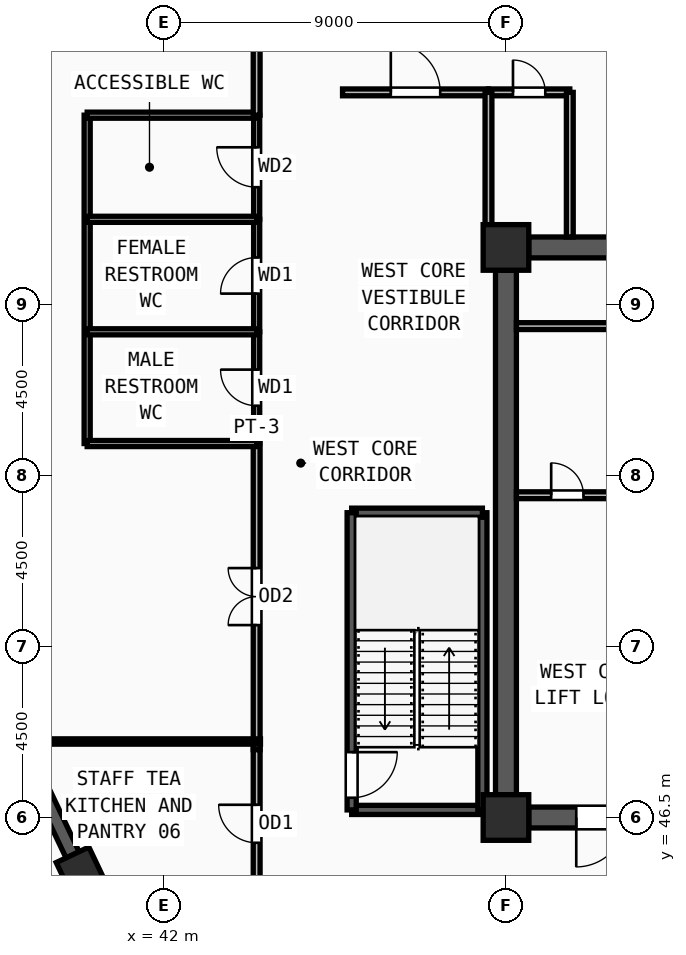
"""IFC4 building model, lengths in metres.
Left out: names, types, materials, properties, quantities, classifications, styles, units other than length and angle.
Written with IfcOpenShell. Run it as: python <this file> out.ifc"""

import sys

from ifc_helpers import new_model, si_unit, direction, frame, frame_2d, origin, origin_2d, place, context, subcontext, project, spatial, rectangle, extrude, source, transform, mapped, element, fill, save


model = new_model("IFC4")
c1 = context("Model", 3, precision=1e-05, world=origin(), true_north=direction((0.0, 1.0)))
c2 = subcontext(c1, "Body", "Model", "MODEL_VIEW")
j1 = project(units=[si_unit("LENGTHUNIT", "METRE"), si_unit("PLANEANGLEUNIT", "RADIAN")], contexts=[c1])
p1 = place(None, origin())
s1 = spatial("IfcSite", under=j1, at=p1, CompositionType="ELEMENT")
p2 = place(p1, origin())
s2 = spatial("IfcBuilding", under=s1, at=p2, CompositionType="ELEMENT")
p3 = place(p2, frame((0.0, 0.0, 309.0)))
s3 = spatial("IfcBuildingStorey", under=s2, at=p3, CompositionType="ELEMENT", Elevation=309.0)
m1 = source(origin(), c2, "Body", "SweptSolid", [
    extrude(rectangle(XDim=1.2, YDim=1.2, at=origin_2d()), origin(), (0.0, 0.0, 1.0), 3.75),
])
for number, where, z_axis, x_axis in (
    (1, (51.0, 46.5, 0.0), (0.0, 0.0, 1.0), (1.0, 0.0, 0.0)),
    (2, (51.0, 61.5, 0.0), (0.0, 0.0, 1.0), (1.0, 0.0, 0.0)),
):
    element("IfcColumn", number, at=place(p3, frame(where, z_axis=z_axis, x_axis=x_axis)), inside=s3, PredefinedType="COLUMN", context=c2, shape_type="MappedRepresentation", body=[
        mapped(m1, transform((0.0, 0.0, 0.0), x_axis=(1.0, 0.0, 0.0), y_axis=(0.0, 1.0, 0.0), z_axis=(0.0, 0.0, 1.0), scale=1.0)),
    ])
m2 = source(origin(), c2, "Body", "SweptSolid", [
    extrude(rectangle(XDim=1.1, YDim=0.95, at=origin_2d()), origin(), (0.0, 0.0, 1.0), 3.75),
])
p4 = place(p3, frame((39.831, 45.022, 0.0), z_axis=(0.0, 0.0, 1.0), x_axis=(-0.428619783775, 0.903484964433, 0.0)))
e3 = element("IfcColumn", 3, at=p4, inside=s3, PredefinedType="COLUMN", context=c2, shape_type="MappedRepresentation", body=[
    mapped(m2, transform((0.0, 0.0, 0.0), x_axis=(1.0, 0.0, 0.0), y_axis=(0.0, 1.0, 0.0), z_axis=(0.0, 0.0, 1.0), scale=1.0)),
])
p5 = place(p3, frame((30.273, 65.167, 0.0), z_axis=(0.0, 0.0, 1.0), x_axis=(0.428684844901, -0.903454096096, 0.0)))
e4 = element("IfcWall", 4, at=p5, inside=s3, PredefinedType="SOLIDWALL", context=c2, shape_type="SweptSolid", body=[
    extrude(rectangle(XDim=21.758, YDim=0.38, at=frame_2d((10.879, 0.0))), origin(), (0.0, 0.0, 1.0), 3.57),
])
m3 = source(origin(), c2, "Body", "SweptSolid", [
    extrude(rectangle(XDim=1.35, YDim=1.85, at=frame_2d((0.675, 0.925))), frame((0.0, 0.2, 0.0), z_axis=(0.0, -1.0, 0.0), x_axis=(1.0, 0.0, 0.0)), (0.0, 0.0, 1.0), 0.4),
])
p6 = place(p5, frame((4.764, 0.0, 0.55)))
e5 = element("IfcOpeningElement", 5, at=p6, cuts=e4, PredefinedType="OPENING", context=c2, shape_type="MappedRepresentation", body=[
    mapped(m3, transform((0.0, 0.0, 0.0), x_axis=(1.0, 0.0, 0.0), y_axis=(0.0, 1.0, 0.0), z_axis=(0.0, 0.0, 1.0), scale=1.0)),
])
p7 = place(p5, frame((10.204, 0.0, 0.55)))
e6 = element("IfcOpeningElement", 6, at=p7, cuts=e4, PredefinedType="OPENING", context=c2, shape_type="MappedRepresentation", body=[
    mapped(m3, transform((0.0, 0.0, 0.0), x_axis=(1.0, 0.0, 0.0), y_axis=(0.0, 1.0, 0.0), z_axis=(0.0, 0.0, 1.0), scale=1.0)),
])
p8 = place(p5, frame((15.643, 0.0, 0.55)))
e7 = element("IfcOpeningElement", 7, at=p8, cuts=e4, PredefinedType="OPENING", context=c2, shape_type="MappedRepresentation", body=[
    mapped(m3, transform((0.0, 0.0, 0.0), x_axis=(1.0, 0.0, 0.0), y_axis=(0.0, 1.0, 0.0), z_axis=(0.0, 0.0, 1.0), scale=1.0)),
])
p9 = place(p3, frame((51.6, 61.5, 0.0), z_axis=(0.0, 0.0, 1.0), x_axis=(1.0, 0.0, 0.0)))
e8 = element("IfcWall", 8, at=p9, inside=s3, PredefinedType="SHEAR", context=c2, shape_type="SweptSolid", body=[
    extrude(rectangle(XDim=7.8, YDim=0.55, at=frame_2d((3.9, 0.0))), origin(), (0.0, 0.0, 1.0), 3.57),
])
p10 = place(p3, frame((59.4, 46.5, 0.0), z_axis=(0.0, 0.0, 1.0), x_axis=(-1.0, 0.0, 0.0)))
e9 = element("IfcWall", 9, at=p10, inside=s3, PredefinedType="SHEAR", context=c2, shape_type="SweptSolid", body=[
    extrude(rectangle(XDim=7.8, YDim=0.55, at=frame_2d((3.9, 0.0))), origin(), (0.0, 0.0, 1.0), 3.57),
])
m4 = source(origin(), c2, "Body", "SweptSolid", [
    extrude(rectangle(XDim=1.3, YDim=2.2, at=frame_2d((0.65, 1.1))), frame((0.0, 0.285, 0.0), z_axis=(0.0, -1.0, 0.0), x_axis=(1.0, 0.0, 0.0)), (0.0, 0.0, 1.0), 0.57),
])
p11 = place(p10, frame((5.25, 0.0, 0.0)))
e10 = element("IfcOpeningElement", 10, at=p11, cuts=e9, PredefinedType="OPENING", context=c2, shape_type="MappedRepresentation", body=[
    mapped(m4, transform((0.0, 0.0, 0.0), x_axis=(1.0, 0.0, 0.0), y_axis=(0.0, 1.0, 0.0), z_axis=(0.0, 0.0, 1.0), scale=1.0)),
])
m5 = source(origin(), c2, "Body", "SweptSolid", [
    extrude(rectangle(XDim=1.0, YDim=2.2, at=frame_2d((0.5, 1.1))), frame((0.0, 0.285, 0.0), z_axis=(0.0, -1.0, 0.0), x_axis=(1.0, 0.0, 0.0)), (0.0, 0.0, 1.0), 0.57),
])
p12 = place(p10, frame((0.75, 0.0, 0.0)))
e11 = element("IfcOpeningElement", 11, at=p12, cuts=e9, PredefinedType="OPENING", context=c2, shape_type="MappedRepresentation", body=[
    mapped(m5, transform((0.0, 0.0, 0.0), x_axis=(1.0, 0.0, 0.0), y_axis=(0.0, 1.0, 0.0), z_axis=(0.0, 0.0, 1.0), scale=1.0)),
])
p13 = place(p3, frame((51.0, 47.1, 0.0), z_axis=(0.0, 0.0, 1.0), x_axis=(0.0, 1.0, 0.0)))
e12 = element("IfcWall", 12, at=p13, inside=s3, PredefinedType="SHEAR", context=c2, shape_type="SweptSolid", body=[
    extrude(rectangle(XDim=13.8, YDim=0.55, at=frame_2d((6.9, 0.0))), origin(), (0.0, 0.0, 1.0), 3.57),
])
p14 = place(p3, frame((46.94, 46.7, 0.0), z_axis=(0.0, 0.0, 1.0), x_axis=(1.0, 0.0, 0.0)))
e13 = element("IfcWall", 13, at=p14, inside=s3, PredefinedType="SOLIDWALL", context=c2, shape_type="SweptSolid", body=[
    extrude(rectangle(XDim=3.44, YDim=0.24, at=frame_2d((1.72, 0.0))), origin(), (0.0, 0.0, 1.0), 3.57),
])
p15 = place(p3, frame((50.38, 46.7, 0.0), z_axis=(0.0, 0.0, 1.0), x_axis=(0.0, 1.0, 0.0)))
e14 = element("IfcWall", 14, at=p15, inside=s3, PredefinedType="SOLIDWALL", context=c2, shape_type="SweptSolid", body=[
    extrude(rectangle(XDim=7.82, YDim=0.24, at=frame_2d((3.91, 0.0))), origin(), (0.0, 0.0, 1.0), 3.57),
])
p16 = place(p3, frame((50.38, 54.52, 0.0), z_axis=(0.0, 0.0, 1.0), x_axis=(-1.0, 0.0, 0.0)))
e15 = element("IfcWall", 15, at=p16, inside=s3, PredefinedType="SOLIDWALL", context=c2, shape_type="SweptSolid", body=[
    extrude(rectangle(XDim=3.44, YDim=0.24, at=frame_2d((1.72, 0.0))), origin(), (0.0, 0.0, 1.0), 3.57),
])
p17 = place(p3, frame((46.94, 54.52, 0.0), z_axis=(0.0, 0.0, 1.0), x_axis=(0.0, -1.0, 0.0)))
e16 = element("IfcWall", 16, at=p17, inside=s3, PredefinedType="SOLIDWALL", context=c2, shape_type="SweptSolid", body=[
    extrude(rectangle(XDim=7.82, YDim=0.24, at=frame_2d((3.91, 0.0))), origin(), (0.0, 0.0, 1.0), 3.57),
])
m6 = source(origin(), c2, "Body", "SweptSolid", [
    extrude(rectangle(XDim=1.2, YDim=2.2, at=frame_2d((0.6, 1.1))), frame((0.0, 0.13, 0.0), z_axis=(0.0, -1.0, 0.0), x_axis=(1.0, 0.0, 0.0)), (0.0, 0.0, 1.0), 0.26),
])
p18 = place(p17, frame((6.3, 0.0, 0.0)))
e17 = element("IfcOpeningElement", 17, at=p18, cuts=e16, PredefinedType="OPENING", context=c2, shape_type="MappedRepresentation", body=[
    mapped(m6, transform((0.0, 0.0, 0.0), x_axis=(1.0, 0.0, 0.0), y_axis=(0.0, 1.0, 0.0), z_axis=(0.0, 0.0, 1.0), scale=1.0)),
])
p19 = place(p3, frame((51.275, 54.98, 0.0), z_axis=(0.0, 0.0, 1.0), x_axis=(1.0, 0.0, 0.0)))
e18 = element("IfcWall", 18, at=p19, inside=s3, PredefinedType="PARTITIONING", context=c2, shape_type="SweptSolid", body=[
    extrude(rectangle(XDim=2.485, YDim=0.18, at=frame_2d((1.243, 0.0))), origin(), (0.0, 0.0, 1.0), 3.57),
])
m7 = source(origin(), c2, "Body", "SweptSolid", [
    extrude(rectangle(XDim=0.85, YDim=2.1, at=frame_2d((0.425, 1.05))), frame((0.0, 0.1, 0.0), z_axis=(0.0, -1.0, 0.0), x_axis=(1.0, 0.0, 0.0)), (0.0, 0.0, 1.0), 0.2),
])
p20 = place(p19, frame((0.915, 0.0, 0.0)))
e19 = element("IfcOpeningElement", 19, at=p20, cuts=e18, PredefinedType="OPENING", context=c2, shape_type="MappedRepresentation", body=[
    mapped(m7, transform((0.0, 0.0, 0.0), x_axis=(1.0, 0.0, 0.0), y_axis=(0.0, 1.0, 0.0), z_axis=(0.0, 0.0, 1.0), scale=1.0)),
])
p21 = place(p3, frame((44.44, 56.34, 0.0), z_axis=(0.0, 0.0, 1.0), x_axis=(0.0, 1.0, 0.0)))
e20 = element("IfcWall", 20, at=p21, inside=s3, PredefinedType="PARTITIONING", context=c2, shape_type="SweptSolid", body=[
    extrude(rectangle(XDim=2.94, YDim=0.16, at=frame_2d((1.47, 0.0))), origin(), (0.0, 0.0, 1.0), 3.57),
])
m8 = source(origin(), c2, "Body", "SweptSolid", [
    extrude(rectangle(XDim=0.95, YDim=2.15, at=frame_2d((0.475, 1.075))), frame((0.0, 0.09, 0.0), z_axis=(0.0, -1.0, 0.0), x_axis=(1.0, 0.0, 0.0)), (0.0, 0.0, 1.0), 0.18),
])
p22 = place(p21, frame((0.995, 0.0, 0.0)))
e21 = element("IfcOpeningElement", 21, at=p22, cuts=e20, PredefinedType="OPENING", context=c2, shape_type="MappedRepresentation", body=[
    mapped(m8, transform((0.0, 0.0, 0.0), x_axis=(1.0, 0.0, 0.0), y_axis=(0.0, 1.0, 0.0), z_axis=(0.0, 0.0, 1.0), scale=1.0)),
])
p23 = place(p3, frame((44.44, 59.28, 0.0), z_axis=(0.0, 0.0, 1.0), x_axis=(0.0, 1.0, 0.0)))
e22 = element("IfcWall", 22, at=p23, inside=s3, PredefinedType="PARTITIONING", context=c2, shape_type="SweptSolid", body=[
    extrude(rectangle(XDim=2.96, YDim=0.16, at=frame_2d((1.48, 0.0))), origin(), (0.0, 0.0, 1.0), 3.57),
])
p24 = place(p23, frame((1.005, 0.0, 0.0)))
e23 = element("IfcOpeningElement", 23, at=p24, cuts=e22, PredefinedType="OPENING", context=c2, shape_type="MappedRepresentation", body=[
    mapped(m8, transform((0.0, 0.0, 0.0), x_axis=(1.0, 0.0, 0.0), y_axis=(0.0, 1.0, 0.0), z_axis=(0.0, 0.0, 1.0), scale=1.0)),
])
p25 = place(p3, frame((44.44, 62.24, 0.0), z_axis=(0.0, 0.0, 1.0), x_axis=(0.0, 1.0, 0.0)))
e24 = element("IfcWall", 24, at=p25, inside=s3, PredefinedType="PARTITIONING", context=c2, shape_type="SweptSolid", body=[
    extrude(rectangle(XDim=2.74, YDim=0.16, at=frame_2d((1.37, 0.0))), origin(), (0.0, 0.0, 1.0), 3.57),
])
m9 = source(origin(), c2, "Body", "SweptSolid", [
    extrude(rectangle(XDim=1.05, YDim=2.15, at=frame_2d((0.525, 1.075))), frame((0.0, 0.09, 0.0), z_axis=(0.0, -1.0, 0.0), x_axis=(1.0, 0.0, 0.0)), (0.0, 0.0, 1.0), 0.18),
])
p26 = place(p25, frame((0.845, 0.0, 0.0)))
e25 = element("IfcOpeningElement", 25, at=p26, cuts=e24, PredefinedType="OPENING", context=c2, shape_type="MappedRepresentation", body=[
    mapped(m9, transform((0.0, 0.0, 0.0), x_axis=(1.0, 0.0, 0.0), y_axis=(0.0, 1.0, 0.0), z_axis=(0.0, 0.0, 1.0), scale=1.0)),
])
p27 = place(p3, frame((50.54, 65.58, 0.0), z_axis=(0.0, 0.0, 1.0), x_axis=(1.0, 0.0, 0.0)))
e26 = element("IfcWall", 26, at=p27, inside=s3, PredefinedType="PARTITIONING", context=c2, shape_type="SweptSolid", body=[
    extrude(rectangle(XDim=2.14, YDim=0.18, at=frame_2d((1.07, 0.0))), origin(), (0.0, 0.0, 1.0), 3.57),
])
p28 = place(p27, frame((0.645, 0.0, 0.0)))
e27 = element("IfcOpeningElement", 27, at=p28, cuts=e26, PredefinedType="OPENING", context=c2, shape_type="MappedRepresentation", body=[
    mapped(m7, transform((0.0, 0.0, 0.0), x_axis=(1.0, 0.0, 0.0), y_axis=(0.0, 1.0, 0.0), z_axis=(0.0, 0.0, 1.0), scale=1.0)),
])
p29 = place(p3, frame((46.7, 65.58, 0.0), z_axis=(0.0, 0.0, 1.0), x_axis=(1.0, 0.0, 0.0)))
e28 = element("IfcWall", 28, at=p29, inside=s3, PredefinedType="PARTITIONING", context=c2, shape_type="SweptSolid", body=[
    extrude(rectangle(XDim=3.84, YDim=0.18, at=frame_2d((1.92, 0.0))), origin(), (0.0, 0.0, 1.0), 3.57),
])
m10 = source(origin(), c2, "Body", "SweptSolid", [
    extrude(rectangle(XDim=1.3, YDim=2.2, at=frame_2d((0.65, 1.1))), frame((0.0, 0.1, 0.0), z_axis=(0.0, -1.0, 0.0), x_axis=(1.0, 0.0, 0.0)), (0.0, 0.0, 1.0), 0.2),
])
p30 = place(p29, frame((1.27, 0.0, 0.0)))
e29 = element("IfcOpeningElement", 29, at=p30, cuts=e28, PredefinedType="OPENING", context=c2, shape_type="MappedRepresentation", body=[
    mapped(m10, transform((0.0, 0.0, 0.0), x_axis=(1.0, 0.0, 0.0), y_axis=(0.0, 1.0, 0.0), z_axis=(0.0, 0.0, 1.0), scale=1.0)),
])
p31 = place(p3, frame((44.44, 48.285, 0.0), z_axis=(0.0, 0.0, 1.0), x_axis=(0.0, 1.0, 0.0)))
e30 = element("IfcWall", 30, at=p31, inside=s3, PredefinedType="PARTITIONING", context=c2, shape_type="SweptSolid", body=[
    extrude(rectangle(XDim=8.055, YDim=0.18, at=frame_2d((4.028, 0.0))), origin(), (0.0, 0.0, 1.0), 3.261),
])
m11 = source(origin(), c2, "Body", "SweptSolid", [
    extrude(rectangle(XDim=1.5, YDim=2.2, at=frame_2d((0.75, 1.1))), frame((0.0, 0.1, 0.0), z_axis=(0.0, -1.0, 0.0), x_axis=(1.0, 0.0, 0.0)), (0.0, 0.0, 1.0), 0.2),
])
p32 = place(p31, frame((3.278, 0.0, 0.0)))
e31 = element("IfcOpeningElement", 31, at=p32, cuts=e30, PredefinedType="OPENING", context=c2, shape_type="MappedRepresentation", body=[
    mapped(m11, transform((0.0, 0.0, 0.0), x_axis=(1.0, 0.0, 0.0), y_axis=(0.0, 1.0, 0.0), z_axis=(0.0, 0.0, 1.0), scale=1.0)),
])
p33 = place(p3, frame((44.44, 44.385, 0.0), z_axis=(0.0, 0.0, 1.0), x_axis=(0.0, 1.0, 0.0)))
e32 = element("IfcWall", 32, at=p33, inside=s3, PredefinedType="PARTITIONING", context=c2, shape_type="SweptSolid", body=[
    extrude(rectangle(XDim=3.9, YDim=0.18, at=frame_2d((1.95, 0.0))), origin(), (0.0, 0.0, 1.0), 3.57),
])
m12 = source(origin(), c2, "Body", "SweptSolid", [
    extrude(rectangle(XDim=1.0, YDim=2.2, at=frame_2d((0.5, 1.1))), frame((0.0, 0.1, 0.0), z_axis=(0.0, -1.0, 0.0), x_axis=(1.0, 0.0, 0.0)), (0.0, 0.0, 1.0), 0.2),
])
p34 = place(p33, frame((1.45, 0.0, 0.0)))
e33 = element("IfcOpeningElement", 33, at=p34, cuts=e32, PredefinedType="OPENING", context=c2, shape_type="MappedRepresentation", body=[
    mapped(m12, transform((0.0, 0.0, 0.0), x_axis=(1.0, 0.0, 0.0), y_axis=(0.0, 1.0, 0.0), z_axis=(0.0, 0.0, 1.0), scale=1.0)),
])
p35 = place(p3, frame((51.275, 59.43, 0.0), z_axis=(0.0, 0.0, 1.0), x_axis=(1.0, 0.0, 0.0)))
e34 = element("IfcWall", 34, at=p35, inside=s3, PredefinedType="PARTITIONING", context=c2, shape_type="SweptSolid", body=[
    extrude(rectangle(XDim=2.505, YDim=0.18, at=frame_2d((1.252, 0.0))), origin(), (0.0, 0.0, 1.0), 3.57),
])
p36 = place(p3, frame((39.98, 56.34, 0.0), z_axis=(0.0, 0.0, 1.0), x_axis=(0.0, 1.0, 0.0)))
e35 = element("IfcWall", 35, at=p36, inside=s3, PredefinedType="PARTITIONING", context=c2, shape_type="SweptSolid", body=[
    extrude(rectangle(XDim=8.64, YDim=0.16, at=frame_2d((4.32, 0.0))), origin(), (0.0, 0.0, 1.0), 3.57),
])
for number, where, z_axis, x_axis in (
    (36, (39.98, 56.34, 0.0), (0.0, 0.0, 1.0), (1.0, 0.0, 0.0)),
    (37, (39.98, 59.28, 0.0), (0.0, 0.0, 1.0), (1.0, 0.0, 0.0)),
    (38, (39.98, 62.24, 0.0), (0.0, 0.0, 1.0), (1.0, 0.0, 0.0)),
    (39, (39.98, 64.98, 0.0), (0.0, 0.0, 1.0), (1.0, 0.0, 0.0)),
):
    element("IfcWall", number, at=place(p3, frame(where, z_axis=z_axis, x_axis=x_axis)), inside=s3, PredefinedType="PARTITIONING", context=c2, shape_type="SweptSolid", body=[
        extrude(rectangle(XDim=4.46, YDim=0.16, at=frame_2d((2.23, 0.0))), origin(), (0.0, 0.0, 1.0), 3.57),
    ])
p37 = place(p3, frame((50.54, 61.95, 0.0), z_axis=(0.0, 0.0, 1.0), x_axis=(0.0, 1.0, 0.0)))
e40 = element("IfcWall", 40, at=p37, inside=s3, PredefinedType="PARTITIONING", context=c2, shape_type="SweptSolid", body=[
    extrude(rectangle(XDim=3.63, YDim=0.18, at=frame_2d((1.815, 0.0))), origin(), (0.0, 0.0, 1.0), 3.57),
])
p38 = place(p3, frame((52.68, 61.775, 0.0), z_axis=(0.0, 0.0, 1.0), x_axis=(0.0, 1.0, 0.0)))
e41 = element("IfcWall", 41, at=p38, inside=s3, PredefinedType="PARTITIONING", context=c2, shape_type="SweptSolid", body=[
    extrude(rectangle(XDim=3.805, YDim=0.18, at=frame_2d((1.903, 0.0))), origin(), (0.0, 0.0, 1.0), 3.57),
])
p39 = place(p3, frame((44.44, 64.98, 0.0), z_axis=(0.0, 0.0, 1.0), x_axis=(0.0, 1.0, 0.0)))
e42 = element("IfcWall", 42, at=p39, inside=s3, PredefinedType="PARTITIONING", context=c2, shape_type="SweptSolid", body=[
    extrude(rectangle(XDim=1.805, YDim=0.18, at=frame_2d((0.902, 0.0))), origin(), (0.0, 0.0, 1.0), 3.57),
])
p40 = place(p3, frame((44.54, 48.5, 0.0), z_axis=(0.0, 0.0, 1.0), x_axis=(-1.0, 0.0, 0.0)))
e43 = element("IfcWall", 43, at=p40, inside=s3, PredefinedType="PARTITIONING", context=c2, shape_type="SweptSolid", body=[
    extrude(rectangle(XDim=7.056, YDim=0.14, at=frame_2d((3.528, 0.0))), origin(), (0.0, 0.0, 1.0), 3.57),
])
m13 = source(origin(), c2, "Body", "SweptSolid", [
    extrude(rectangle(XDim=1.3, YDim=2.2, at=frame_2d((0.65, 1.1))), frame((0.0, 0.025, 0.0), z_axis=(0.0, -1.0, 0.0), x_axis=(1.0, 0.0, 0.0)), (0.0, 0.0, 1.0), 0.05),
])
p41 = place(p11, origin())
e44 = element("IfcDoor", 44, at=p41, inside=s3, OperationType="SINGLE_SWING_RIGHT", PredefinedType="DOOR", context=c2, shape_type="MappedRepresentation", body=[
    mapped(m13, transform((0.0, 0.0, 0.0), x_axis=(1.0, 0.0, 0.0), y_axis=(0.0, 1.0, 0.0), z_axis=(0.0, 0.0, 1.0), scale=1.0)),
])
fill(e10, e44)
m14 = source(origin(), c2, "Body", "SweptSolid", [
    extrude(rectangle(XDim=1.2, YDim=2.2, at=frame_2d((0.6, 1.1))), frame((0.0, 0.025, 0.0), z_axis=(0.0, -1.0, 0.0), x_axis=(1.0, 0.0, 0.0)), (0.0, 0.0, 1.0), 0.05),
])
p42 = place(p18, origin())
e45 = element("IfcDoor", 45, at=p42, inside=s3, OperationType="SINGLE_SWING_LEFT", PredefinedType="DOOR", context=c2, shape_type="MappedRepresentation", body=[
    mapped(m14, transform((0.0, 0.0, 0.0), x_axis=(1.0, 0.0, 0.0), y_axis=(0.0, 1.0, 0.0), z_axis=(0.0, 0.0, 1.0), scale=1.0)),
])
fill(e17, e45)
m15 = source(origin(), c2, "Body", "SweptSolid", [
    extrude(rectangle(XDim=0.85, YDim=2.1, at=frame_2d((0.425, 1.05))), frame((0.0, 0.025, 0.0), z_axis=(0.0, -1.0, 0.0), x_axis=(1.0, 0.0, 0.0)), (0.0, 0.0, 1.0), 0.05),
])
p43 = place(p20, origin())
e46 = element("IfcDoor", 46, at=p43, inside=s3, OperationType="SINGLE_SWING_LEFT", PredefinedType="DOOR", context=c2, shape_type="MappedRepresentation", body=[
    mapped(m15, transform((0.0, 0.0, 0.0), x_axis=(1.0, 0.0, 0.0), y_axis=(0.0, 1.0, 0.0), z_axis=(0.0, 0.0, 1.0), scale=1.0)),
])
fill(e19, e46)
m16 = source(origin(), c2, "Body", "SweptSolid", [
    extrude(rectangle(XDim=0.95, YDim=2.15, at=frame_2d((0.475, 1.075))), frame((0.0, 0.025, 0.0), z_axis=(0.0, -1.0, 0.0), x_axis=(1.0, 0.0, 0.0)), (0.0, 0.0, 1.0), 0.05),
])
p44 = place(p22, origin())
e47 = element("IfcDoor", 47, at=p44, inside=s3, OperationType="SINGLE_SWING_RIGHT", PredefinedType="DOOR", context=c2, shape_type="MappedRepresentation", body=[
    mapped(m16, transform((0.0, 0.0, 0.0), x_axis=(1.0, 0.0, 0.0), y_axis=(0.0, 1.0, 0.0), z_axis=(0.0, 0.0, 1.0), scale=1.0)),
])
fill(e21, e47)
p45 = place(p24, origin())
e48 = element("IfcDoor", 48, at=p45, inside=s3, OperationType="SINGLE_SWING_LEFT", PredefinedType="DOOR", context=c2, shape_type="MappedRepresentation", body=[
    mapped(m16, transform((0.0, 0.0, 0.0), x_axis=(1.0, 0.0, 0.0), y_axis=(0.0, 1.0, 0.0), z_axis=(0.0, 0.0, 1.0), scale=1.0)),
])
fill(e23, e48)
m17 = source(origin(), c2, "Body", "SweptSolid", [
    extrude(rectangle(XDim=1.05, YDim=2.15, at=frame_2d((0.525, 1.075))), frame((0.0, 0.025, 0.0), z_axis=(0.0, -1.0, 0.0), x_axis=(1.0, 0.0, 0.0)), (0.0, 0.0, 1.0), 0.05),
])
p46 = place(p26, origin())
e49 = element("IfcDoor", 49, at=p46, inside=s3, OperationType="SINGLE_SWING_RIGHT", PredefinedType="DOOR", context=c2, shape_type="MappedRepresentation", body=[
    mapped(m17, transform((0.0, 0.0, 0.0), x_axis=(1.0, 0.0, 0.0), y_axis=(0.0, 1.0, 0.0), z_axis=(0.0, 0.0, 1.0), scale=1.0)),
])
fill(e25, e49)
p47 = place(p28, origin())
e50 = element("IfcDoor", 50, at=p47, inside=s3, OperationType="SINGLE_SWING_LEFT", PredefinedType="DOOR", context=c2, shape_type="MappedRepresentation", body=[
    mapped(m15, transform((0.0, 0.0, 0.0), x_axis=(1.0, 0.0, 0.0), y_axis=(0.0, 1.0, 0.0), z_axis=(0.0, 0.0, 1.0), scale=1.0)),
])
fill(e27, e50)
p48 = place(p30, origin())
e51 = element("IfcDoor", 51, at=p48, inside=s3, OperationType="SINGLE_SWING_LEFT", PredefinedType="DOOR", context=c2, shape_type="MappedRepresentation", body=[
    mapped(m13, transform((0.0, 0.0, 0.0), x_axis=(1.0, 0.0, 0.0), y_axis=(0.0, 1.0, 0.0), z_axis=(0.0, 0.0, 1.0), scale=1.0)),
])
fill(e29, e51)
m18 = source(origin(), c2, "Body", "SweptSolid", [
    extrude(rectangle(XDim=1.5, YDim=2.2, at=frame_2d((0.75, 1.1))), frame((0.0, 0.025, 0.0), z_axis=(0.0, -1.0, 0.0), x_axis=(1.0, 0.0, 0.0)), (0.0, 0.0, 1.0), 0.05),
])
p49 = place(p32, origin())
e52 = element("IfcDoor", 52, at=p49, inside=s3, OperationType="DOUBLE_DOOR_SINGLE_SWING", PredefinedType="DOOR", context=c2, shape_type="MappedRepresentation", body=[
    mapped(m18, transform((0.0, 0.0, 0.0), x_axis=(1.0, 0.0, 0.0), y_axis=(0.0, 1.0, 0.0), z_axis=(0.0, 0.0, 1.0), scale=1.0)),
])
fill(e31, e52)
m19 = source(origin(), c2, "Body", "SweptSolid", [
    extrude(rectangle(XDim=1.0, YDim=2.2, at=frame_2d((0.5, 1.1))), frame((0.0, 0.025, 0.0), z_axis=(0.0, -1.0, 0.0), x_axis=(1.0, 0.0, 0.0)), (0.0, 0.0, 1.0), 0.05),
])
p50 = place(p34, origin())
e53 = element("IfcDoor", 53, at=p50, inside=s3, OperationType="SINGLE_SWING_RIGHT", PredefinedType="DOOR", context=c2, shape_type="MappedRepresentation", body=[
    mapped(m19, transform((0.0, 0.0, 0.0), x_axis=(1.0, 0.0, 0.0), y_axis=(0.0, 1.0, 0.0), z_axis=(0.0, 0.0, 1.0), scale=1.0)),
])
fill(e33, e53)
save(model, sys.argv[1])
